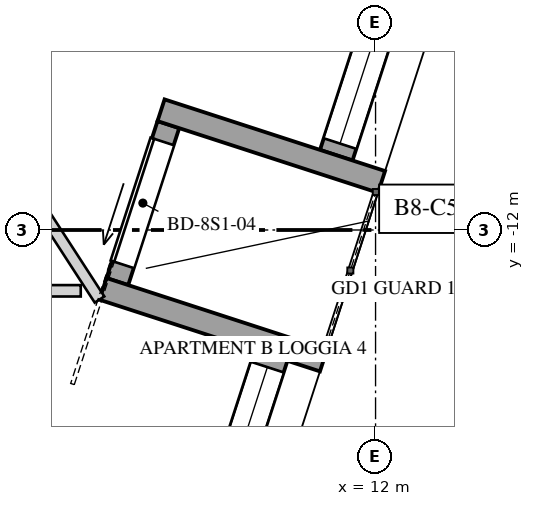
"""IFC4 building model, lengths in metres.
Left out: names, types, materials, properties, quantities, classifications, styles, units other than length and angle.
Written with IfcOpenShell. Run it as: python <this file> out.ifc"""

import sys

from ifc_helpers import new_model, si_unit, direction, frame, frame_2d, origin, place, context, subcontext, project, spatial, rectangle, extrude, element, fill, save


model = new_model("IFC4")
c1 = context("Model", 3, precision=1e-05, world=origin(), true_north=direction((0.0, 1.0)))
c2 = subcontext(c1, "Body", "Model", "MODEL_VIEW")
j1 = project(units=[si_unit("LENGTHUNIT", "METRE"), si_unit("PLANEANGLEUNIT", "RADIAN")], contexts=[c1])
p1 = place(None, origin())
s1 = spatial("IfcSite", under=j1, at=p1, CompositionType="ELEMENT")
p2 = place(p1, origin())
s2 = spatial("IfcBuilding", under=s1, at=p2, CompositionType="ELEMENT")
p3 = place(p2, frame((0.0, 0.0, 344.4)))
s3 = spatial("IfcBuildingStorey", under=s2, at=p3, CompositionType="ELEMENT", Elevation=344.4)
p4 = place(p3, frame((9.925, -15.812, 0.0), z_axis=(0.0, 0.0, 1.0), x_axis=(0.308930512416, 0.95108461164, 0.0)))
e1 = element("IfcWall", 1, at=p4, inside=s3, PredefinedType="SOLIDWALL", context=c2, shape_type="SweptSolid", body=[
    extrude(rectangle(XDim=2.271, YDim=0.45, at=frame_2d((1.136, 0.0))), origin(), (0.0, 0.0, 1.0), 3.3),
])
p5 = place(p4, frame((0.161, 0.0, 0.4)))
e2 = element("IfcOpeningElement", 2, at=p5, cuts=e1, PredefinedType="OPENING", context=c2, shape_type="SweptSolid", body=[
    extrude(rectangle(XDim=1.95, YDim=2.1, at=frame_2d((0.975, 1.05))), frame((0.0, 0.235, 0.0), z_axis=(0.0, -1.0, 0.0), x_axis=(1.0, 0.0, 0.0)), (0.0, 0.0, 1.0), 0.47),
])
p6 = place(p3, frame((11.483, -11.016, 0.0), z_axis=(0.0, 0.0, 1.0), x_axis=(0.309027740273, 0.951053024674, 0.0)))
e3 = element("IfcWall", 3, at=p6, inside=s3, PredefinedType="SOLIDWALL", context=c2, shape_type="SweptSolid", body=[
    extrude(rectangle(XDim=2.271, YDim=0.45, at=frame_2d((1.136, 0.0))), origin(), (0.0, 0.0, 1.0), 3.3),
])
p7 = place(p6, frame((0.161, 0.0, 0.4)))
e4 = element("IfcOpeningElement", 4, at=p7, cuts=e3, PredefinedType="OPENING", context=c2, shape_type="SweptSolid", body=[
    extrude(rectangle(XDim=1.95, YDim=2.75, at=frame_2d((0.975, 1.375))), frame((0.0, 0.235, 0.0), z_axis=(0.0, -1.0, 0.0), x_axis=(1.0, 0.0, 0.0)), (0.0, 0.0, 1.0), 0.47),
])
p8 = place(p3, frame((8.603, -12.678, 0.0), z_axis=(0.0, 0.0, 1.0), x_axis=(0.308999623589, 0.95106216023, 0.0)))
e5 = element("IfcWall", 5, at=p8, inside=s3, PredefinedType="SOLIDWALL", context=c2, shape_type="SweptSolid", body=[
    extrude(rectangle(XDim=2.171, YDim=0.3, at=frame_2d((1.085, 0.0))), origin(), (0.0, 0.0, 1.0), 3.3),
])
p9 = place(p8, frame((0.236, 0.0, 0.0)))
e6 = element("IfcOpeningElement", 6, at=p9, cuts=e5, PredefinedType="OPENING", context=c2, shape_type="SweptSolid", body=[
    extrude(rectangle(XDim=1.7, YDim=2.5, at=frame_2d((0.85, 1.25))), frame((0.0, 0.16, 0.0), z_axis=(0.0, -1.0, 0.0), x_axis=(1.0, 0.0, 0.0)), (0.0, 0.0, 1.0), 0.32),
])
for number, where, z_axis, x_axis in (
    (7, (11.315, -13.717, 0.0), (0.0, 0.0, 1.0), (-0.951, 0.309, 0.0)),
    (8, (12.079, -11.367, 0.0), (0.0, 0.0, 1.0), (-0.951, 0.309, 0.0)),
):
    element("IfcWall", number, at=place(p3, frame(where, z_axis=z_axis, x_axis=x_axis)), inside=s3, PredefinedType="SOLIDWALL", context=c2, shape_type="SweptSolid", body=[
        extrude(rectangle(XDim=3.05, YDim=0.3, at=frame_2d((1.525, 0.0))), origin(), (0.0, 0.0, 1.0), 3.3),
    ])
p10 = place(p3, frame((8.121, -12.8, 0.0), z_axis=(0.0, 0.0, 1.0), x_axis=(-1.0, 0.0, 0.0)))
e9 = element("IfcWall", 9, at=p10, inside=s3, PredefinedType="PARTITIONING", context=c2, shape_type="SweptSolid", body=[
    extrude(rectangle(XDim=0.695, YDim=0.15, at=frame_2d((0.348, 0.0))), origin(), (0.0, 0.0, 1.0), 2.95),
])
p11 = place(p3, frame((8.369, -12.915, 0.0), z_axis=(0.0, 0.0, 1.0), x_axis=(-0.543718462002, 0.839267677251, 0.0)))
e10 = element("IfcWall", 10, at=p11, inside=s3, PredefinedType="PARTITIONING", context=c2, shape_type="SweptSolid", body=[
    extrude(rectangle(XDim=2.015, YDim=0.15, at=frame_2d((1.007, 0.0))), origin(), (0.0, 0.0, 1.0), 3.65),
])
p12 = place(p5, origin())
e11 = element("IfcWindow", 11, at=p12, inside=s3, PartitioningType="SINGLE_PANEL", PredefinedType="WINDOW", context=c2, shape_type="SweptSolid", body=[
    extrude(rectangle(XDim=1.95, YDim=2.1, at=frame_2d((0.975, 1.05))), frame((0.0, 0.03, 0.0), z_axis=(0.0, -1.0, 0.0), x_axis=(1.0, 0.0, 0.0)), (0.0, 0.0, 1.0), 0.06),
])
fill(e2, e11)
p13 = place(p7, origin())
e12 = element("IfcWindow", 12, at=p13, inside=s3, PartitioningType="SINGLE_PANEL", PredefinedType="WINDOW", context=c2, shape_type="SweptSolid", body=[
    extrude(rectangle(XDim=1.95, YDim=2.75, at=frame_2d((0.975, 1.375))), frame((0.0, 0.03, 0.0), z_axis=(0.0, -1.0, 0.0), x_axis=(1.0, 0.0, 0.0)), (0.0, 0.0, 1.0), 0.06),
])
fill(e4, e12)
p14 = place(p9, origin())
e13 = element("IfcDoor", 13, at=p14, inside=s3, OperationType="SLIDING_TO_LEFT", PredefinedType="DOOR", context=c2, shape_type="SweptSolid", body=[
    extrude(rectangle(XDim=1.7, YDim=2.5, at=frame_2d((0.85, 1.25))), frame((0.0, 0.025, 0.0), z_axis=(0.0, -1.0, 0.0), x_axis=(1.0, 0.0, 0.0)), (0.0, 0.0, 1.0), 0.05),
])
fill(e6, e13)
save(model, sys.argv[1])
